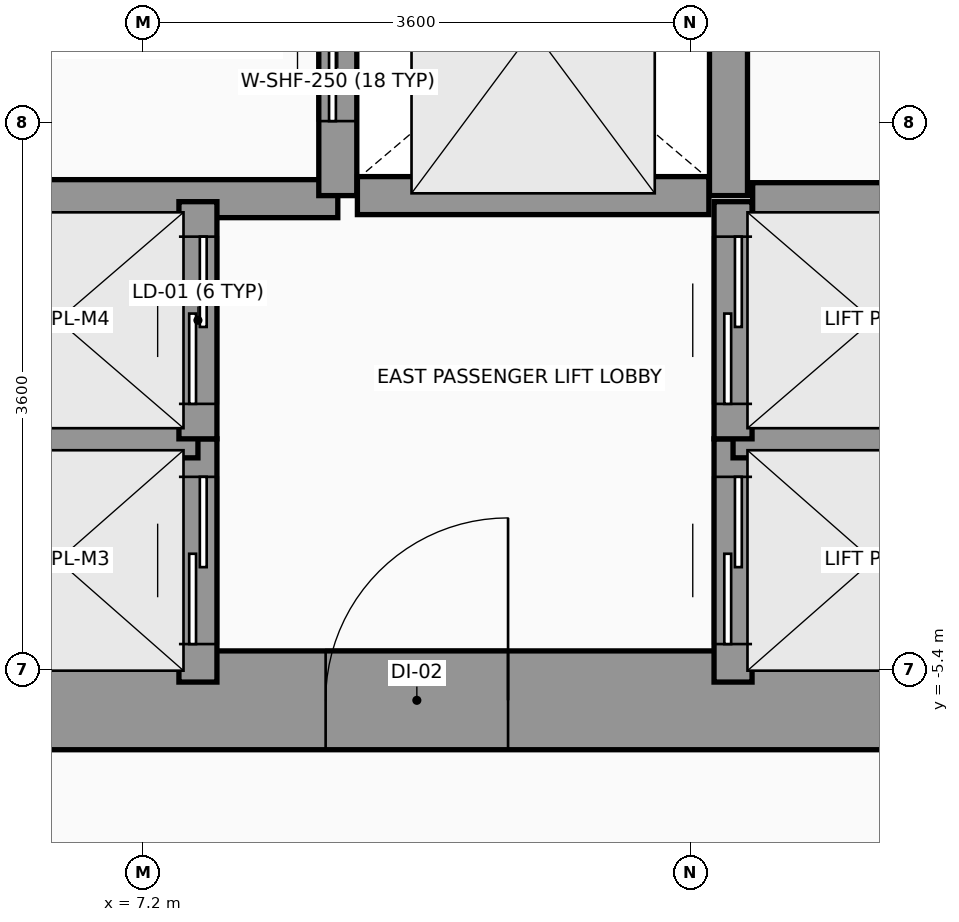
"""IFC4 building model, lengths in metres.
Left out: names, types, materials, properties, quantities, classifications, styles, units other than length and angle.
Written with IfcOpenShell. Run it as: python <this file> out.ifc"""

import sys

from ifc_helpers import new_model, si_unit, direction, frame, frame_2d, origin, place, context, subcontext, project, spatial, rectangle, extrude, source, transform, mapped, element, fill, save


model = new_model("IFC4")
c1 = context("Model", 3, precision=1e-05, world=origin(), true_north=direction((0.0, 1.0)))
c2 = subcontext(c1, "Body", "Model", "MODEL_VIEW")
j1 = project(units=[si_unit("LENGTHUNIT", "METRE"), si_unit("PLANEANGLEUNIT", "RADIAN")], contexts=[c1])
p1 = place(None, origin())
s1 = spatial("IfcSite", under=j1, at=p1, CompositionType="ELEMENT")
p2 = place(p1, origin())
s2 = spatial("IfcBuilding", under=s1, at=p2, CompositionType="ELEMENT")
p3 = place(p2, origin())
s3 = spatial("IfcBuildingStorey", under=s2, at=p3, CompositionType="ELEMENT", Elevation=0.0)
p4 = place(p3, frame((5.4, -5.6, 0.0), z_axis=(0.0, 0.0, 1.0), x_axis=(1.0, 0.0, 0.0)))
e1 = element("IfcWall", 1, at=p4, inside=s3, PredefinedType="SHEAR", context=c2, shape_type="SweptSolid", body=[
    extrude(rectangle(XDim=7.8, YDim=0.65, at=frame_2d((3.9, 0.0))), origin(), (0.0, 0.0, 1.0), 5.15),
])
p5 = place(p4, frame((3.0, 0.0, 0.0)))
e2 = element("IfcOpeningElement", 2, at=p5, cuts=e1, PredefinedType="OPENING", context=c2, shape_type="SweptSolid", body=[
    extrude(rectangle(XDim=1.2, YDim=2.2, at=frame_2d((0.6, 1.1))), frame((0.0, 0.335, 0.0), z_axis=(0.0, -1.0, 0.0), x_axis=(1.0, 0.0, 0.0)), (0.0, 0.0, 1.0), 0.67),
])
p6 = place(p3, frame((5.4, -2.3, 0.0), z_axis=(0.0, 0.0, 1.0), x_axis=(1.0, 0.0, 0.0)))
e3 = element("IfcWall", 3, at=p6, inside=s3, PredefinedType="SOLIDWALL", context=c2, shape_type="SweptSolid", body=[
    extrude(rectangle(XDim=3.08, YDim=0.25, at=frame_2d((1.54, 0.0))), origin(), (0.0, 0.0, 1.0), 5.15),
])
p7 = place(p3, frame((8.48, -2.28, 0.0), z_axis=(0.0, 0.0, 1.0), x_axis=(0.0, 1.0, 0.0)))
e4 = element("IfcWall", 4, at=p7, inside=s3, PredefinedType="SOLIDWALL", context=c2, shape_type="SweptSolid", body=[
    extrude(rectangle(XDim=2.18, YDim=0.25, at=frame_2d((1.09, 0.0))), origin(), (0.0, 0.0, 1.0), 5.15),
])
p8 = place(p7, frame((0.49, 0.0, 0.0)))
e5 = element("IfcOpeningElement", 5, at=p8, cuts=e4, PredefinedType="OPENING", context=c2, shape_type="SweptSolid", body=[
    extrude(rectangle(XDim=1.2, YDim=2.2, at=frame_2d((0.6, 1.1))), frame((0.0, 0.135, 0.0), z_axis=(0.0, -1.0, 0.0), x_axis=(1.0, 0.0, 0.0)), (0.0, 0.0, 1.0), 0.27),
])
p9 = place(p3, frame((11.05, -2.28, 0.0), z_axis=(0.0, 0.0, 1.0), x_axis=(0.0, 1.0, 0.0)))
e6 = element("IfcWall", 6, at=p9, inside=s3, PredefinedType="SOLIDWALL", context=c2, shape_type="SweptSolid", body=[
    extrude(rectangle(XDim=2.18, YDim=0.25, at=frame_2d((1.09, 0.0))), origin(), (0.0, 0.0, 1.0), 5.15),
])
p10 = place(p3, frame((8.609, -2.28, 0.0), z_axis=(0.0, 0.0, 1.0), x_axis=(1.0, 0.0, 0.0)))
e7 = element("IfcWall", 7, at=p10, inside=s3, PredefinedType="SOLIDWALL", context=c2, shape_type="SweptSolid", body=[
    extrude(rectangle(XDim=2.312, YDim=0.25, at=frame_2d((1.156, 0.0))), origin(), (0.0, 0.0, 1.0), 5.15),
])
p11 = place(p3, frame((11.08, -5.48, 0.0), z_axis=(0.0, 0.0, 1.0), x_axis=(0.0, 1.0, 0.0)))
e8 = element("IfcWall", 8, at=p11, inside=s3, PredefinedType="SOLIDWALL", context=c2, shape_type="SweptSolid", body=[
    extrude(rectangle(XDim=1.6, YDim=0.25, at=frame_2d((0.8, 0.0))), origin(), (0.0, 0.0, 1.0), 5.15),
])
p12 = place(p11, frame((0.25, 0.0, 0.0)))
e9 = element("IfcOpeningElement", 9, at=p12, cuts=e8, PredefinedType="OPENING", context=c2, shape_type="SweptSolid", body=[
    extrude(rectangle(XDim=1.1, YDim=2.2, at=frame_2d((0.55, 1.1))), frame((0.0, 0.135, 0.0), z_axis=(0.0, -1.0, 0.0), x_axis=(1.0, 0.0, 0.0)), (0.0, 0.0, 1.0), 0.27),
])
p13 = place(p3, frame((11.08, -3.88, 0.0), z_axis=(0.0, 0.0, 1.0), x_axis=(1.0, 0.0, 0.0)))
e10 = element("IfcWall", 10, at=p13, inside=s3, PredefinedType="SOLIDWALL", context=c2, shape_type="SweptSolid", body=[
    extrude(rectangle(XDim=1.84, YDim=0.25, at=frame_2d((0.92, 0.0))), origin(), (0.0, 0.0, 1.0), 5.15),
])
p14 = place(p3, frame((11.08, -3.88, 0.0), z_axis=(0.0, 0.0, 1.0), x_axis=(0.0, 1.0, 0.0)))
e11 = element("IfcWall", 11, at=p14, inside=s3, PredefinedType="SOLIDWALL", context=c2, shape_type="SweptSolid", body=[
    extrude(rectangle(XDim=1.56, YDim=0.25, at=frame_2d((0.78, 0.0))), origin(), (0.0, 0.0, 1.0), 5.15),
])
p15 = place(p14, frame((0.23, 0.0, 0.0)))
e12 = element("IfcOpeningElement", 12, at=p15, cuts=e11, PredefinedType="OPENING", context=c2, shape_type="SweptSolid", body=[
    extrude(rectangle(XDim=1.1, YDim=2.2, at=frame_2d((0.55, 1.1))), frame((0.0, 0.135, 0.0), z_axis=(0.0, -1.0, 0.0), x_axis=(1.0, 0.0, 0.0)), (0.0, 0.0, 1.0), 0.27),
])
p16 = place(p3, frame((11.209, -2.32, 0.0), z_axis=(0.0, 0.0, 1.0), x_axis=(1.0, 0.0, 0.0)))
e13 = element("IfcWall", 13, at=p16, inside=s3, PredefinedType="SOLIDWALL", context=c2, shape_type="SweptSolid", body=[
    extrude(rectangle(XDim=1.582, YDim=0.25, at=frame_2d((0.791, 0.0))), origin(), (0.0, 0.0, 1.0), 5.15),
])
p17 = place(p3, frame((7.56, -5.48, 0.0), z_axis=(0.0, 0.0, 1.0), x_axis=(0.0, 1.0, 0.0)))
e14 = element("IfcWall", 14, at=p17, inside=s3, PredefinedType="SOLIDWALL", context=c2, shape_type="SweptSolid", body=[
    extrude(rectangle(XDim=1.6, YDim=0.25, at=frame_2d((0.8, 0.0))), origin(), (0.0, 0.0, 1.0), 5.15),
])
p18 = place(p17, frame((0.25, 0.0, 0.0)))
e15 = element("IfcOpeningElement", 15, at=p18, cuts=e14, PredefinedType="OPENING", context=c2, shape_type="SweptSolid", body=[
    extrude(rectangle(XDim=1.1, YDim=2.2, at=frame_2d((0.55, 1.1))), frame((0.0, 0.135, 0.0), z_axis=(0.0, -1.0, 0.0), x_axis=(1.0, 0.0, 0.0)), (0.0, 0.0, 1.0), 0.27),
])
p19 = place(p3, frame((5.72, -3.88, 0.0), z_axis=(0.0, 0.0, 1.0), x_axis=(1.0, 0.0, 0.0)))
e16 = element("IfcWall", 16, at=p19, inside=s3, PredefinedType="SOLIDWALL", context=c2, shape_type="SweptSolid", body=[
    extrude(rectangle(XDim=1.84, YDim=0.25, at=frame_2d((0.92, 0.0))), origin(), (0.0, 0.0, 1.0), 5.15),
])
p20 = place(p3, frame((7.56, -3.88, 0.0), z_axis=(0.0, 0.0, 1.0), x_axis=(0.0, 1.0, 0.0)))
e17 = element("IfcWall", 17, at=p20, inside=s3, PredefinedType="SOLIDWALL", context=c2, shape_type="SweptSolid", body=[
    extrude(rectangle(XDim=1.56, YDim=0.25, at=frame_2d((0.78, 0.0))), origin(), (0.0, 0.0, 1.0), 5.15),
])
p21 = place(p20, frame((0.23, 0.0, 0.0)))
e18 = element("IfcOpeningElement", 18, at=p21, cuts=e17, PredefinedType="OPENING", context=c2, shape_type="SweptSolid", body=[
    extrude(rectangle(XDim=1.1, YDim=2.2, at=frame_2d((0.55, 1.1))), frame((0.0, 0.135, 0.0), z_axis=(0.0, -1.0, 0.0), x_axis=(1.0, 0.0, 0.0)), (0.0, 0.0, 1.0), 0.27),
])
m1 = source(origin(), c2, "Body", "SweptSolid", [
    extrude(rectangle(XDim=1.2, YDim=2.2, at=frame_2d((0.6, 1.1))), frame((0.0, 0.025, 0.0), z_axis=(0.0, -1.0, 0.0), x_axis=(1.0, 0.0, 0.0)), (0.0, 0.0, 1.0), 0.05),
])
p22 = place(p5, origin())
e19 = element("IfcDoor", 19, at=p22, inside=s3, OperationType="SINGLE_SWING_RIGHT", PredefinedType="DOOR", context=c2, shape_type="MappedRepresentation", body=[
    mapped(m1, transform((0.0, 0.0, 0.0), x_axis=(1.0, 0.0, 0.0), y_axis=(0.0, 1.0, 0.0), z_axis=(0.0, 0.0, 1.0), scale=1.0)),
])
fill(e2, e19)
p23 = place(p8, origin())
e20 = element("IfcDoor", 20, at=p23, inside=s3, OperationType="SLIDING_TO_RIGHT", PredefinedType="DOOR", context=c2, shape_type="MappedRepresentation", body=[
    mapped(m1, transform((0.0, 0.0, 0.0), x_axis=(1.0, 0.0, 0.0), y_axis=(0.0, 1.0, 0.0), z_axis=(0.0, 0.0, 1.0), scale=1.0)),
])
fill(e5, e20)
m2 = source(origin(), c2, "Body", "SweptSolid", [
    extrude(rectangle(XDim=1.1, YDim=2.2, at=frame_2d((0.55, 1.1))), frame((0.0, 0.025, 0.0), z_axis=(0.0, -1.0, 0.0), x_axis=(1.0, 0.0, 0.0)), (0.0, 0.0, 1.0), 0.05),
])
p24 = place(p12, origin())
e21 = element("IfcDoor", 21, at=p24, inside=s3, OperationType="SLIDING_TO_LEFT", PredefinedType="DOOR", context=c2, shape_type="MappedRepresentation", body=[
    mapped(m2, transform((0.0, 0.0, 0.0), x_axis=(1.0, 0.0, 0.0), y_axis=(0.0, 1.0, 0.0), z_axis=(0.0, 0.0, 1.0), scale=1.0)),
])
fill(e9, e21)
p25 = place(p15, origin())
e22 = element("IfcDoor", 22, at=p25, inside=s3, OperationType="SLIDING_TO_LEFT", PredefinedType="DOOR", context=c2, shape_type="MappedRepresentation", body=[
    mapped(m2, transform((0.0, 0.0, 0.0), x_axis=(1.0, 0.0, 0.0), y_axis=(0.0, 1.0, 0.0), z_axis=(0.0, 0.0, 1.0), scale=1.0)),
])
fill(e12, e22)
p26 = place(p18, origin())
e23 = element("IfcDoor", 23, at=p26, inside=s3, OperationType="SLIDING_TO_LEFT", PredefinedType="DOOR", context=c2, shape_type="MappedRepresentation", body=[
    mapped(m2, transform((0.0, 0.0, 0.0), x_axis=(1.0, 0.0, 0.0), y_axis=(0.0, 1.0, 0.0), z_axis=(0.0, 0.0, 1.0), scale=1.0)),
])
fill(e15, e23)
p27 = place(p21, origin())
e24 = element("IfcDoor", 24, at=p27, inside=s3, OperationType="SLIDING_TO_LEFT", PredefinedType="DOOR", context=c2, shape_type="MappedRepresentation", body=[
    mapped(m2, transform((0.0, 0.0, 0.0), x_axis=(1.0, 0.0, 0.0), y_axis=(0.0, 1.0, 0.0), z_axis=(0.0, 0.0, 1.0), scale=1.0)),
])
fill(e18, e24)
save(model, sys.argv[1])
